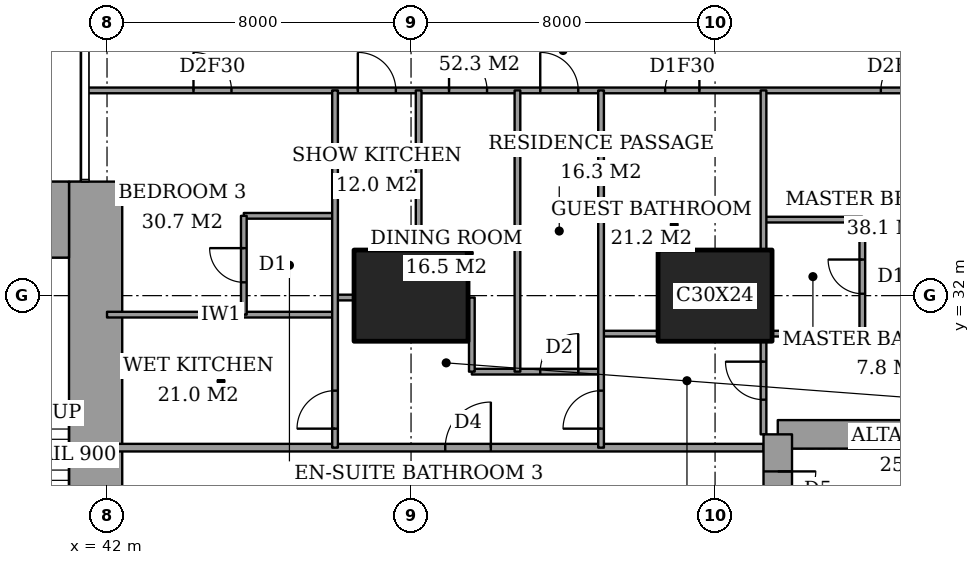
"""IFC4 building model, lengths in metres.
Left out: names, types, materials, properties, quantities, classifications, styles, units other than length and angle.
Written with IfcOpenShell. Run it as: python <this file> out.ifc"""

import sys

from ifc_helpers import new_model, si_unit, direction, frame, frame_2d, origin, origin_2d, place, context, subcontext, project, spatial, rectangle, extrude, element, fill, save


model = new_model("IFC4")
c1 = context("Model", 3, precision=1e-05, world=origin(), true_north=direction((0.0, 1.0)))
c2 = subcontext(c1, "Body", "Model", "MODEL_VIEW")
j1 = project(units=[si_unit("LENGTHUNIT", "METRE"), si_unit("PLANEANGLEUNIT", "RADIAN")], contexts=[c1])
p1 = place(None, origin())
s1 = spatial("IfcSite", under=j1, at=p1, CompositionType="ELEMENT")
p2 = place(p1, origin())
s2 = spatial("IfcBuilding", under=s1, at=p2, CompositionType="ELEMENT")
p3 = place(p2, frame((0.0, 0.0, 99.8)))
s3 = spatial("IfcBuildingStorey", under=s2, at=p3, CompositionType="ELEMENT", Elevation=99.8)
for number, where, z_axis, x_axis in (
    (1, (50.0, 32.0, 0.0), (0.0, 0.0, 1.0), (1.0, 0.0, 0.0)),
    (2, (58.0, 32.0, 0.0), (0.0, 0.0, 1.0), (1.0, 0.0, 0.0)),
):
    element("IfcColumn", number, at=place(p3, frame(where, z_axis=z_axis, x_axis=x_axis)), inside=s3, PredefinedType="COLUMN", context=c2, shape_type="SweptSolid", body=[
        extrude(rectangle(XDim=3.0, YDim=2.4, at=origin_2d()), origin(), (0.0, 0.0, 1.0), 3.6),
    ])
p4 = place(p3, frame((37.85, 34.0, 0.0), z_axis=(0.0, 0.0, 1.0), x_axis=(1.0, 0.0, 0.0)))
e3 = element("IfcWall", 3, at=p4, inside=s3, PredefinedType="SHEAR", context=c2, shape_type="SweptSolid", body=[
    extrude(rectangle(XDim=3.15, YDim=2.0, at=frame_2d((1.575, 0.0))), origin(), (0.0, 0.0, 1.0), 3.6),
])
p5 = place(p3, frame((41.7, 24.85, 0.0), z_axis=(0.0, 0.0, 1.0), x_axis=(0.0, 1.0, 0.0)))
e4 = element("IfcWall", 4, at=p5, inside=s3, PredefinedType="SHEAR", context=c2, shape_type="SweptSolid", body=[
    extrude(rectangle(XDim=10.15, YDim=1.4, at=frame_2d((5.075, 0.0))), origin(), (0.0, 0.0, 1.0), 3.6),
])
p6 = place(p3, frame((64.1, 28.35, 0.0), z_axis=(0.0, 0.0, 1.0), x_axis=(-1.0, 0.0, 0.0)))
e5 = element("IfcWall", 5, at=p6, inside=s3, PredefinedType="SHEAR", context=c2, shape_type="SweptSolid", body=[
    extrude(rectangle(XDim=4.45, YDim=0.75, at=frame_2d((2.225, 0.0))), origin(), (0.0, 0.0, 1.0), 3.6),
])
p7 = place(p3, frame((59.65, 28.35, 0.0), z_axis=(0.0, 0.0, 1.0), x_axis=(0.0, -1.0, 0.0)))
e6 = element("IfcWall", 6, at=p7, inside=s3, PredefinedType="SHEAR", context=c2, shape_type="SweptSolid", body=[
    extrude(rectangle(XDim=8.7, YDim=0.75, at=frame_2d((4.35, 0.0))), origin(), (0.0, 0.0, 1.0), 3.6),
])
p8 = place(p7, frame((0.975, 0.0, 0.0)))
e7 = element("IfcOpeningElement", 7, at=p8, cuts=e6, PredefinedType="OPENING", context=c2, shape_type="SweptSolid", body=[
    extrude(rectangle(XDim=1.0, YDim=2.1, at=frame_2d((0.5, 1.05))), frame((0.0, 0.385, 0.0), z_axis=(0.0, -1.0, 0.0), x_axis=(1.0, 0.0, 0.0)), (0.0, 0.0, 1.0), 0.77),
])
p9 = place(p3, frame((42.0, 28.0, 0.0), z_axis=(0.0, 0.0, 1.0), x_axis=(1.0, 0.0, 0.0)))
e8 = element("IfcWall", 8, at=p9, inside=s3, PredefinedType="PARTITIONING", context=c2, shape_type="SweptSolid", body=[
    extrude(rectangle(XDim=17.275, YDim=0.2, at=frame_2d((8.637, 0.0))), origin(), (0.0, 0.0, 1.0), 3.35),
])
p10 = place(p9, frame((8.9, 0.0, 0.0)))
e9 = element("IfcOpeningElement", 9, at=p10, cuts=e8, PredefinedType="OPENING", context=c2, shape_type="SweptSolid", body=[
    extrude(rectangle(XDim=1.2, YDim=2.4, at=frame_2d((0.6, 1.2))), frame((0.0, 0.11, 0.0), z_axis=(0.0, -1.0, 0.0), x_axis=(1.0, 0.0, 0.0)), (0.0, 0.0, 1.0), 0.22),
])
p11 = place(p3, frame((51.6, 30.0, 0.0), z_axis=(0.0, 0.0, 1.0), x_axis=(1.0, 0.0, 0.0)))
e10 = element("IfcWall", 10, at=p11, inside=s3, PredefinedType="PARTITIONING", context=c2, shape_type="SweptSolid", body=[
    extrude(rectangle(XDim=3.4, YDim=0.15, at=frame_2d((1.7, 0.0))), origin(), (0.0, 0.0, 1.0), 3.35),
])
p12 = place(p11, frame((1.8, 0.0, 0.0)))
e11 = element("IfcOpeningElement", 11, at=p12, cuts=e10, PredefinedType="OPENING", context=c2, shape_type="SweptSolid", body=[
    extrude(rectangle(XDim=1.0, YDim=2.1, at=frame_2d((0.5, 1.05))), frame((0.0, 0.085, 0.0), z_axis=(0.0, -1.0, 0.0), x_axis=(1.0, 0.0, 0.0)), (0.0, 0.0, 1.0), 0.17),
])
p13 = place(p3, frame((55.0, 31.0, 0.0), z_axis=(0.0, 0.0, 1.0), x_axis=(1.0, 0.0, 0.0)))
e12 = element("IfcWall", 12, at=p13, inside=s3, PredefinedType="PARTITIONING", context=c2, shape_type="SweptSolid", body=[
    extrude(rectangle(XDim=1.5, YDim=0.15, at=frame_2d((0.75, 0.0))), origin(), (0.0, 0.0, 1.0), 3.35),
])
p14 = place(p3, frame((59.5, 31.0, 0.0), z_axis=(0.0, 0.0, 1.0), x_axis=(1.0, 0.0, 0.0)))
e13 = element("IfcWall", 13, at=p14, inside=s3, PredefinedType="PARTITIONING", context=c2, shape_type="SweptSolid", body=[
    extrude(rectangle(XDim=5.15, YDim=0.15, at=frame_2d((2.575, 0.0))), origin(), (0.0, 0.0, 1.0), 3.35),
])
p15 = place(p3, frame((42.0, 31.5, 0.0), z_axis=(0.0, 0.0, 1.0), x_axis=(1.0, 0.0, 0.0)))
e14 = element("IfcWall", 14, at=p15, inside=s3, PredefinedType="PARTITIONING", context=c2, shape_type="SweptSolid", body=[
    extrude(rectangle(XDim=6.0, YDim=0.15, at=frame_2d((3.0, 0.0))), origin(), (0.0, 0.0, 1.0), 3.35),
])
p16 = place(p3, frame((48.0, 31.95, 0.0), z_axis=(0.0, 0.0, 1.0), x_axis=(1.0, 0.0, 0.0)))
e15 = element("IfcWall", 15, at=p16, inside=s3, PredefinedType="PARTITIONING", context=c2, shape_type="SweptSolid", body=[
    extrude(rectangle(XDim=0.5, YDim=0.15, at=frame_2d((0.25, 0.0))), origin(), (0.0, 0.0, 1.0), 2.634),
])
p17 = place(p3, frame((59.275, 34.0, 0.0), z_axis=(0.0, 0.0, 1.0), x_axis=(1.0, 0.0, 0.0)))
e16 = element("IfcWall", 16, at=p17, inside=s3, PredefinedType="PARTITIONING", context=c2, shape_type="SweptSolid", body=[
    extrude(rectangle(XDim=2.6, YDim=0.15, at=frame_2d((1.3, 0.0))), origin(), (0.0, 0.0, 1.0), 3.35),
])
p18 = place(p3, frame((45.6, 34.1, 0.0), z_axis=(0.0, 0.0, 1.0), x_axis=(1.0, 0.0, 0.0)))
e17 = element("IfcWall", 17, at=p18, inside=s3, PredefinedType="PARTITIONING", context=c2, shape_type="SweptSolid", body=[
    extrude(rectangle(XDim=2.4, YDim=0.15, at=frame_2d((1.2, 0.0))), origin(), (0.0, 0.0, 1.0), 3.35),
])
p19 = place(p3, frame((41.439, 37.4, 0.0), z_axis=(0.0, 0.0, 1.0), x_axis=(1.0, 0.0, 0.0)))
e18 = element("IfcWall", 18, at=p19, inside=s3, PredefinedType="PARTITIONING", context=c2, shape_type="SweptSolid", body=[
    extrude(rectangle(XDim=25.011, YDim=0.15, at=frame_2d((12.505, 0.0))), origin(), (0.0, 0.0, 1.0), 3.35),
])
p20 = place(p19, frame((11.961, 0.0, 0.0)))
e19 = element("IfcOpeningElement", 19, at=p20, cuts=e18, PredefinedType="OPENING", context=c2, shape_type="SweptSolid", body=[
    extrude(rectangle(XDim=1.0, YDim=2.1, at=frame_2d((0.5, 1.05))), frame((0.0, 0.085, 0.0), z_axis=(0.0, -1.0, 0.0), x_axis=(1.0, 0.0, 0.0)), (0.0, 0.0, 1.0), 0.17),
])
p21 = place(p19, frame((20.924, 0.0, 0.0)))
e20 = element("IfcOpeningElement", 20, at=p21, cuts=e18, PredefinedType="OPENING", context=c2, shape_type="SweptSolid", body=[
    extrude(rectangle(XDim=1.0, YDim=2.1, at=frame_2d((0.5, 1.05))), frame((0.0, 0.085, 0.0), z_axis=(0.0, -1.0, 0.0), x_axis=(1.0, 0.0, 0.0)), (0.0, 0.0, 1.0), 0.17),
])
p22 = place(p19, frame((15.249, 0.0, 0.0)))
e21 = element("IfcOpeningElement", 21, at=p22, cuts=e18, PredefinedType="OPENING", context=c2, shape_type="SweptSolid", body=[
    extrude(rectangle(XDim=0.9, YDim=2.1, at=frame_2d((0.45, 1.05))), frame((0.0, 0.085, 0.0), z_axis=(0.0, -1.0, 0.0), x_axis=(1.0, 0.0, 0.0)), (0.0, 0.0, 1.0), 0.17),
])
p23 = place(p19, frame((9.561, 0.0, 0.0)))
e22 = element("IfcOpeningElement", 22, at=p23, cuts=e18, PredefinedType="OPENING", context=c2, shape_type="SweptSolid", body=[
    extrude(rectangle(XDim=1.0, YDim=2.1, at=frame_2d((0.5, 1.05))), frame((0.0, 0.085, 0.0), z_axis=(0.0, -1.0, 0.0), x_axis=(1.0, 0.0, 0.0)), (0.0, 0.0, 1.0), 0.17),
])
p24 = place(p19, frame((7.161, 0.0, 0.0)))
e23 = element("IfcOpeningElement", 23, at=p24, cuts=e18, PredefinedType="OPENING", context=c2, shape_type="SweptSolid", body=[
    extrude(rectangle(XDim=1.0, YDim=2.1, at=frame_2d((0.5, 1.05))), frame((0.0, 0.085, 0.0), z_axis=(0.0, -1.0, 0.0), x_axis=(1.0, 0.0, 0.0)), (0.0, 0.0, 1.0), 0.17),
])
p25 = place(p19, frame((2.836, 0.0, 0.0)))
e24 = element("IfcOpeningElement", 24, at=p25, cuts=e18, PredefinedType="OPENING", context=c2, shape_type="SweptSolid", body=[
    extrude(rectangle(XDim=1.0, YDim=2.1, at=frame_2d((0.5, 1.05))), frame((0.0, 0.085, 0.0), z_axis=(0.0, -1.0, 0.0), x_axis=(1.0, 0.0, 0.0)), (0.0, 0.0, 1.0), 0.17),
])
p26 = place(p3, frame((45.6, 31.5, 0.0), z_axis=(0.0, 0.0, 1.0), x_axis=(0.0, 1.0, 0.0)))
e25 = element("IfcWall", 25, at=p26, inside=s3, PredefinedType="PARTITIONING", context=c2, shape_type="SweptSolid", body=[
    extrude(rectangle(XDim=2.6, YDim=0.15, at=frame_2d((1.3, 0.0))), origin(), (0.0, 0.0, 1.0), 3.35),
])
p27 = place(p26, frame((0.85, 0.0, 0.0)))
e26 = element("IfcOpeningElement", 26, at=p27, cuts=e25, PredefinedType="OPENING", context=c2, shape_type="SweptSolid", body=[
    extrude(rectangle(XDim=0.9, YDim=2.1, at=frame_2d((0.45, 1.05))), frame((0.0, 0.085, 0.0), z_axis=(0.0, -1.0, 0.0), x_axis=(1.0, 0.0, 0.0)), (0.0, 0.0, 1.0), 0.17),
])
p28 = place(p3, frame((48.0, 28.0, 0.0), z_axis=(0.0, 0.0, 1.0), x_axis=(0.0, 1.0, 0.0)))
e27 = element("IfcWall", 27, at=p28, inside=s3, PredefinedType="PARTITIONING", context=c2, shape_type="SweptSolid", body=[
    extrude(rectangle(XDim=9.4, YDim=0.15, at=frame_2d((4.7, 0.0))), origin(), (0.0, 0.0, 1.0), 3.35),
])
p29 = place(p28, frame((0.5, 0.0, 0.0)))
e28 = element("IfcOpeningElement", 28, at=p29, cuts=e27, PredefinedType="OPENING", context=c2, shape_type="SweptSolid", body=[
    extrude(rectangle(XDim=1.0, YDim=2.1, at=frame_2d((0.5, 1.05))), frame((0.0, 0.085, 0.0), z_axis=(0.0, -1.0, 0.0), x_axis=(1.0, 0.0, 0.0)), (0.0, 0.0, 1.0), 0.17),
])
p30 = place(p3, frame((50.2, 33.2, 0.0), z_axis=(0.0, 0.0, 1.0), x_axis=(0.0, 1.0, 0.0)))
e29 = element("IfcWall", 29, at=p30, inside=s3, PredefinedType="PARTITIONING", context=c2, shape_type="SweptSolid", body=[
    extrude(rectangle(XDim=4.2, YDim=0.15, at=frame_2d((2.1, 0.0))), origin(), (0.0, 0.0, 1.0), 3.35),
])
p31 = place(p3, frame((51.6, 30.0, 0.0), z_axis=(0.0, 0.0, 1.0), x_axis=(0.0, 1.0, 0.0)))
e30 = element("IfcWall", 30, at=p31, inside=s3, PredefinedType="PARTITIONING", context=c2, shape_type="SweptSolid", body=[
    extrude(rectangle(XDim=1.95, YDim=0.15, at=frame_2d((0.975, 0.0))), origin(), (0.0, 0.0, 1.0), 3.35),
])
p32 = place(p3, frame((52.8, 30.0, 0.0), z_axis=(0.0, 0.0, 1.0), x_axis=(0.0, 1.0, 0.0)))
e31 = element("IfcWall", 31, at=p32, inside=s3, PredefinedType="PARTITIONING", context=c2, shape_type="SweptSolid", body=[
    extrude(rectangle(XDim=7.4, YDim=0.15, at=frame_2d((3.7, 0.0))), origin(), (0.0, 0.0, 1.0), 3.35),
])
p33 = place(p3, frame((55.0, 28.0, 0.0), z_axis=(0.0, 0.0, 1.0), x_axis=(0.0, 1.0, 0.0)))
e32 = element("IfcWall", 32, at=p33, inside=s3, PredefinedType="PARTITIONING", context=c2, shape_type="SweptSolid", body=[
    extrude(rectangle(XDim=9.4, YDim=0.15, at=frame_2d((4.7, 0.0))), origin(), (0.0, 0.0, 1.0), 3.35),
])
p34 = place(p33, frame((0.5, 0.0, 0.0)))
e33 = element("IfcOpeningElement", 33, at=p34, cuts=e32, PredefinedType="OPENING", context=c2, shape_type="SweptSolid", body=[
    extrude(rectangle(XDim=1.0, YDim=2.1, at=frame_2d((0.5, 1.05))), frame((0.0, 0.085, 0.0), z_axis=(0.0, -1.0, 0.0), x_axis=(1.0, 0.0, 0.0)), (0.0, 0.0, 1.0), 0.17),
])
p35 = place(p3, frame((59.275, 28.35, 0.0), z_axis=(0.0, 0.0, 1.0), x_axis=(0.0, 1.0, 0.0)))
e34 = element("IfcWall", 34, at=p35, inside=s3, PredefinedType="PARTITIONING", context=c2, shape_type="SweptSolid", body=[
    extrude(rectangle(XDim=2.45, YDim=0.15, at=frame_2d((1.225, 0.0))), origin(), (0.0, 0.0, 1.0), 3.35),
])
p36 = place(p35, frame((0.913, 0.0, 0.0)))
e35 = element("IfcOpeningElement", 35, at=p36, cuts=e34, PredefinedType="OPENING", context=c2, shape_type="SweptSolid", body=[
    extrude(rectangle(XDim=1.0, YDim=2.1, at=frame_2d((0.5, 1.05))), frame((0.0, 0.085, 0.0), z_axis=(0.0, -1.0, 0.0), x_axis=(1.0, 0.0, 0.0)), (0.0, 0.0, 1.0), 0.17),
])
p37 = place(p3, frame((59.275, 33.2, 0.0), z_axis=(0.0, 0.0, 1.0), x_axis=(0.0, 1.0, 0.0)))
e36 = element("IfcWall", 36, at=p37, inside=s3, PredefinedType="PARTITIONING", context=c2, shape_type="SweptSolid", body=[
    extrude(rectangle(XDim=4.2, YDim=0.15, at=frame_2d((2.1, 0.0))), origin(), (0.0, 0.0, 1.0), 3.35),
])
p38 = place(p3, frame((61.875, 31.0, 0.0), z_axis=(0.0, 0.0, 1.0), x_axis=(0.0, 1.0, 0.0)))
e37 = element("IfcWall", 37, at=p38, inside=s3, PredefinedType="PARTITIONING", context=c2, shape_type="SweptSolid", body=[
    extrude(rectangle(XDim=3.0, YDim=0.15, at=frame_2d((1.5, 0.0))), origin(), (0.0, 0.0, 1.0), 3.35),
])
p39 = place(p38, frame((1.05, 0.0, 0.0)))
e38 = element("IfcOpeningElement", 38, at=p39, cuts=e37, PredefinedType="OPENING", context=c2, shape_type="SweptSolid", body=[
    extrude(rectangle(XDim=0.9, YDim=2.1, at=frame_2d((0.45, 1.05))), frame((0.0, 0.085, 0.0), z_axis=(0.0, -1.0, 0.0), x_axis=(1.0, 0.0, 0.0)), (0.0, 0.0, 1.0), 0.17),
])
p40 = place(p20, origin())
e39 = element("IfcDoor", 39, at=p40, inside=s3, OperationType="SINGLE_SWING_RIGHT", PredefinedType="DOOR", context=c2, shape_type="SweptSolid", body=[
    extrude(rectangle(XDim=1.0, YDim=2.1, at=frame_2d((0.5, 1.05))), frame((0.0, 0.025, 0.0), z_axis=(0.0, -1.0, 0.0), x_axis=(1.0, 0.0, 0.0)), (0.0, 0.0, 1.0), 0.05),
])
fill(e19, e39)
p41 = place(p39, origin())
e40 = element("IfcDoor", 40, at=p41, inside=s3, OperationType="SINGLE_SWING_LEFT", PredefinedType="DOOR", context=c2, shape_type="SweptSolid", body=[
    extrude(rectangle(XDim=0.9, YDim=2.1, at=frame_2d((0.45, 1.05))), frame((0.0, 0.025, 0.0), z_axis=(0.0, -1.0, 0.0), x_axis=(1.0, 0.0, 0.0)), (0.0, 0.0, 1.0), 0.05),
])
fill(e38, e40)
p42 = place(p21, origin())
e41 = element("IfcDoor", 41, at=p42, inside=s3, OperationType="SINGLE_SWING_LEFT", PredefinedType="DOOR", context=c2, shape_type="SweptSolid", body=[
    extrude(rectangle(XDim=1.0, YDim=2.1, at=frame_2d((0.5, 1.05))), frame((0.0, 0.025, 0.0), z_axis=(0.0, -1.0, 0.0), x_axis=(1.0, 0.0, 0.0)), (0.0, 0.0, 1.0), 0.05),
])
fill(e20, e41)
p43 = place(p36, origin())
e42 = element("IfcDoor", 42, at=p43, inside=s3, OperationType="SINGLE_SWING_LEFT", PredefinedType="DOOR", context=c2, shape_type="SweptSolid", body=[
    extrude(rectangle(XDim=1.0, YDim=2.1, at=frame_2d((0.5, 1.05))), frame((0.0, 0.025, 0.0), z_axis=(0.0, -1.0, 0.0), x_axis=(1.0, 0.0, 0.0)), (0.0, 0.0, 1.0), 0.05),
])
fill(e35, e42)
p44 = place(p22, origin())
e43 = element("IfcDoor", 43, at=p44, inside=s3, OperationType="SINGLE_SWING_LEFT", PredefinedType="DOOR", context=c2, shape_type="SweptSolid", body=[
    extrude(rectangle(XDim=0.9, YDim=2.1, at=frame_2d((0.45, 1.05))), frame((0.0, 0.025, 0.0), z_axis=(0.0, -1.0, 0.0), x_axis=(1.0, 0.0, 0.0)), (0.0, 0.0, 1.0), 0.05),
])
fill(e21, e43)
p45 = place(p34, origin())
e44 = element("IfcDoor", 44, at=p45, inside=s3, OperationType="SINGLE_SWING_RIGHT", PredefinedType="DOOR", context=c2, shape_type="SweptSolid", body=[
    extrude(rectangle(XDim=1.0, YDim=2.1, at=frame_2d((0.5, 1.05))), frame((0.0, 0.025, 0.0), z_axis=(0.0, -1.0, 0.0), x_axis=(1.0, 0.0, 0.0)), (0.0, 0.0, 1.0), 0.05),
])
fill(e33, e44)
p46 = place(p10, origin())
e45 = element("IfcDoor", 45, at=p46, inside=s3, OperationType="SINGLE_SWING_LEFT", PredefinedType="DOOR", context=c2, shape_type="SweptSolid", body=[
    extrude(rectangle(XDim=1.2, YDim=2.4, at=frame_2d((0.6, 1.2))), frame((0.0, 0.025, 0.0), z_axis=(0.0, -1.0, 0.0), x_axis=(1.0, 0.0, 0.0)), (0.0, 0.0, 1.0), 0.05),
])
fill(e9, e45)
p47 = place(p12, origin())
e46 = element("IfcDoor", 46, at=p47, inside=s3, OperationType="SINGLE_SWING_LEFT", PredefinedType="DOOR", context=c2, shape_type="SweptSolid", body=[
    extrude(rectangle(XDim=1.0, YDim=2.1, at=frame_2d((0.5, 1.05))), frame((0.0, 0.025, 0.0), z_axis=(0.0, -1.0, 0.0), x_axis=(1.0, 0.0, 0.0)), (0.0, 0.0, 1.0), 0.05),
])
fill(e11, e46)
p48 = place(p23, origin())
e47 = element("IfcDoor", 47, at=p48, inside=s3, OperationType="SINGLE_SWING_RIGHT", PredefinedType="DOOR", context=c2, shape_type="SweptSolid", body=[
    extrude(rectangle(XDim=1.0, YDim=2.1, at=frame_2d((0.5, 1.05))), frame((0.0, 0.025, 0.0), z_axis=(0.0, -1.0, 0.0), x_axis=(1.0, 0.0, 0.0)), (0.0, 0.0, 1.0), 0.05),
])
fill(e22, e47)
p49 = place(p24, origin())
e48 = element("IfcDoor", 48, at=p49, inside=s3, OperationType="SINGLE_SWING_RIGHT", PredefinedType="DOOR", context=c2, shape_type="SweptSolid", body=[
    extrude(rectangle(XDim=1.0, YDim=2.1, at=frame_2d((0.5, 1.05))), frame((0.0, 0.025, 0.0), z_axis=(0.0, -1.0, 0.0), x_axis=(1.0, 0.0, 0.0)), (0.0, 0.0, 1.0), 0.05),
])
fill(e23, e48)
p50 = place(p27, origin())
e49 = element("IfcDoor", 49, at=p50, inside=s3, OperationType="SINGLE_SWING_LEFT", PredefinedType="DOOR", context=c2, shape_type="SweptSolid", body=[
    extrude(rectangle(XDim=0.9, YDim=2.1, at=frame_2d((0.45, 1.05))), frame((0.0, 0.025, 0.0), z_axis=(0.0, -1.0, 0.0), x_axis=(1.0, 0.0, 0.0)), (0.0, 0.0, 1.0), 0.05),
])
fill(e26, e49)
p51 = place(p25, origin())
e50 = element("IfcDoor", 50, at=p51, inside=s3, OperationType="SINGLE_SWING_RIGHT", PredefinedType="DOOR", context=c2, shape_type="SweptSolid", body=[
    extrude(rectangle(XDim=1.0, YDim=2.1, at=frame_2d((0.5, 1.05))), frame((0.0, 0.025, 0.0), z_axis=(0.0, -1.0, 0.0), x_axis=(1.0, 0.0, 0.0)), (0.0, 0.0, 1.0), 0.05),
])
fill(e24, e50)
p52 = place(p29, origin())
e51 = element("IfcDoor", 51, at=p52, inside=s3, OperationType="SINGLE_SWING_RIGHT", PredefinedType="DOOR", context=c2, shape_type="SweptSolid", body=[
    extrude(rectangle(XDim=1.0, YDim=2.1, at=frame_2d((0.5, 1.05))), frame((0.0, 0.025, 0.0), z_axis=(0.0, -1.0, 0.0), x_axis=(1.0, 0.0, 0.0)), (0.0, 0.0, 1.0), 0.05),
])
fill(e28, e51)
p53 = place(p8, origin())
e52 = element("IfcDoor", 52, at=p53, inside=s3, OperationType="SINGLE_SWING_RIGHT", PredefinedType="DOOR", context=c2, shape_type="SweptSolid", body=[
    extrude(rectangle(XDim=1.0, YDim=2.1, at=frame_2d((0.5, 1.05))), frame((0.0, 0.025, 0.0), z_axis=(0.0, -1.0, 0.0), x_axis=(1.0, 0.0, 0.0)), (0.0, 0.0, 1.0), 0.05),
])
fill(e7, e52)
save(model, sys.argv[1])
